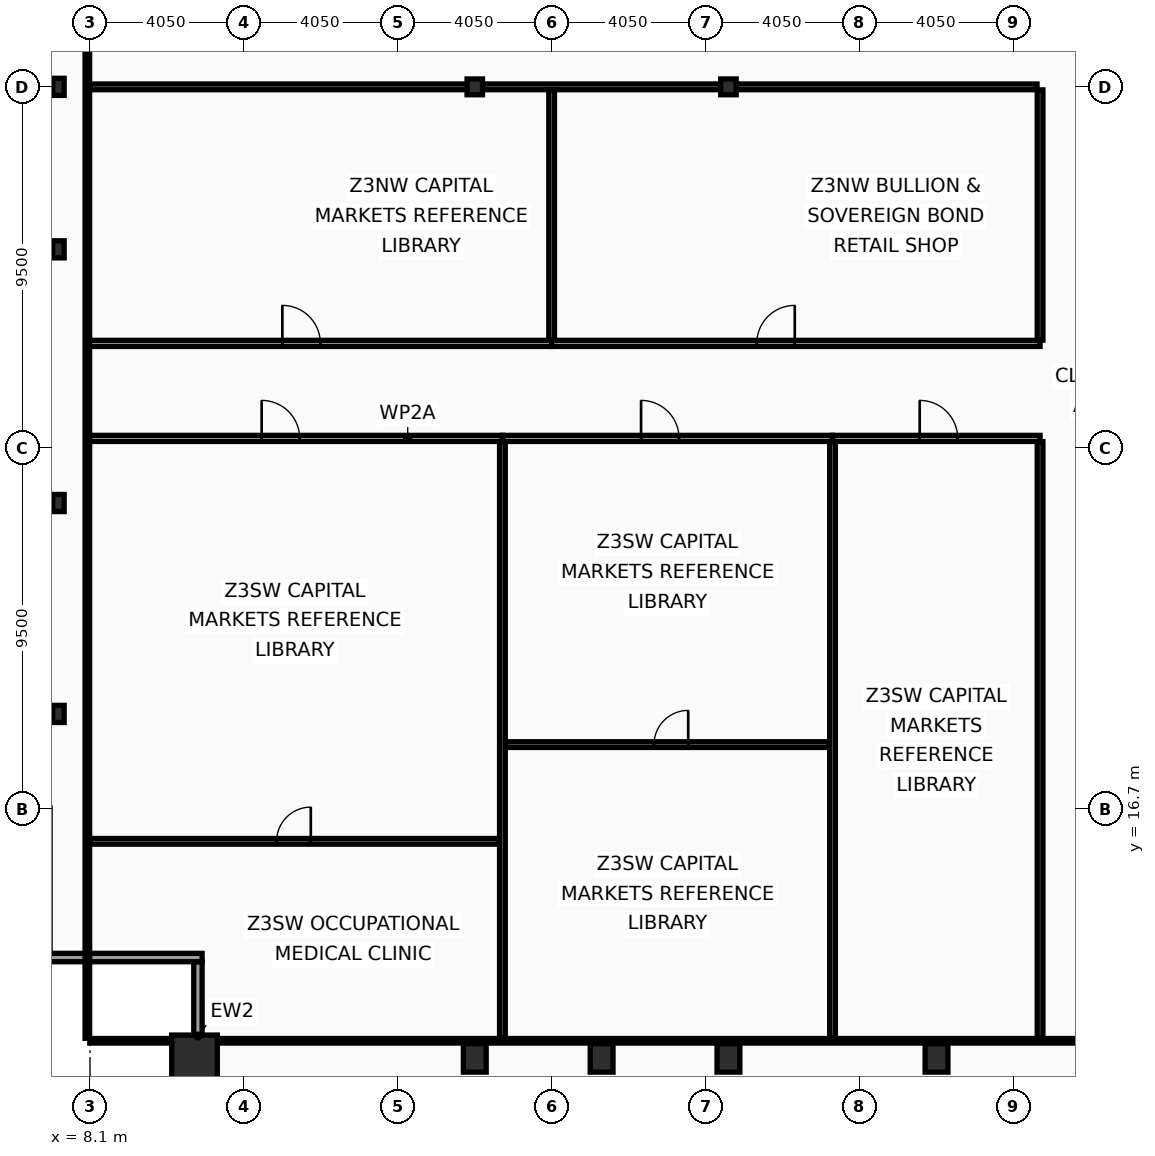
"""IFC4 building model, lengths in metres.
Left out: names, types, materials, properties, quantities, classifications, styles, units other than length and angle.
Written with IfcOpenShell. Run it as: python <this file> out.ifc"""

import sys

from ifc_helpers import new_model, si_unit, direction, frame, frame_2d, origin, origin_2d, place, context, subcontext, project, spatial, rectangle, hollow_rectangle, i_section, extrude, element, fill, save


model = new_model("IFC4")
c1 = context("Model", 3, precision=1e-05, world=origin(), true_north=direction((0.0, 1.0)))
c2 = subcontext(c1, "Body", "Model", "MODEL_VIEW")
j1 = project(units=[si_unit("LENGTHUNIT", "METRE"), si_unit("PLANEANGLEUNIT", "RADIAN")], contexts=[c1])
p1 = place(None, origin())
s1 = spatial("IfcSite", under=j1, at=p1, CompositionType="ELEMENT")
p2 = place(p1, origin())
s2 = spatial("IfcBuilding", under=s1, at=p2, CompositionType="ELEMENT")
p3 = place(p2, frame((0.0, 0.0, 199.4)))
s3 = spatial("IfcBuildingStorey", under=s2, at=p3, CompositionType="ELEMENT", Elevation=199.4)
p4 = place(p3, frame((10.85, 10.15, 0.0), z_axis=(0.0, 0.0, 1.0), x_axis=(1.0, 0.0, 0.0)))
e1 = element("IfcColumn", 1, at=p4, inside=s3, PredefinedType="COLUMN", context=c2, shape_type="SweptSolid", body=[
    extrude(hollow_rectangle(XDim=1.2, YDim=1.2, WallThickness=0.06, at=origin_2d()), origin(), (0.0, 0.0, 1.0), 3.6),
])
for number, where, z_axis, x_axis in (
    (2, (18.225, 10.15, 0.0), (0.0, 0.0, 1.0), (1.0, 0.0, 0.0)),
    (3, (21.562, 10.15, 0.0), (0.0, 0.0, 1.0), (1.0, 0.0, 0.0)),
    (4, (24.9, 10.15, 0.0), (0.0, 0.0, 1.0), (1.0, 0.0, 0.0)),
    (5, (30.375, 10.15, 0.0), (0.0, 0.0, 1.0), (1.0, 0.0, 0.0)),
):
    element("IfcColumn", number, at=place(p3, frame(where, z_axis=z_axis, x_axis=x_axis)), inside=s3, PredefinedType="COLUMN", context=c2, shape_type="SweptSolid", body=[
        extrude(hollow_rectangle(XDim=0.6, YDim=0.75, WallThickness=0.045, at=origin_2d()), origin(), (0.0, 0.0, 1.0), 3.6),
    ])
for number, where, z_axis, x_axis in (
    (6, (7.27, 19.2, 0.0), (0.0, 0.0, 1.0), (1.0, 0.0, 0.0)),
    (7, (7.27, 24.75, 0.0), (0.0, 0.0, 1.0), (1.0, 0.0, 0.0)),
    (8, (7.27, 31.425, 0.0), (0.0, 0.0, 1.0), (1.0, 0.0, 0.0)),
    (9, (7.27, 35.7, 0.0), (0.0, 0.0, 1.0), (1.0, 0.0, 0.0)),
):
    element("IfcColumn", number, at=place(p3, frame(where, z_axis=z_axis, x_axis=x_axis)), inside=s3, PredefinedType="COLUMN", context=c2, shape_type="SweptSolid", body=[
        extrude(i_section(OverallWidth=0.3, OverallDepth=0.45, WebThickness=0.014, FlangeThickness=0.026, at=origin_2d()), origin(), (0.0, 0.0, 1.0), 3.6),
    ])
for number, where, z_axis, x_axis in (
    (10, (18.225, 35.7, 0.0), (0.0, 0.0, 1.0), (1.0, 0.0, 0.0)),
    (11, (24.9, 35.7, 0.0), (0.0, 0.0, 1.0), (1.0, 0.0, 0.0)),
):
    element("IfcColumn", number, at=place(p3, frame(where, z_axis=z_axis, x_axis=x_axis)), inside=s3, PredefinedType="COLUMN", context=c2, shape_type="SweptSolid", body=[
        extrude(i_section(OverallWidth=0.406, OverallDepth=0.416, WebThickness=0.03, FlangeThickness=0.048, at=origin_2d()), origin(), (0.0, 0.0, 1.0), 3.6),
    ])
p5 = place(p3, frame((10.94, 8.77, 0.0), z_axis=(0.0, 0.0, 1.0), x_axis=(0.0, 1.0, 0.0)))
e12 = element("IfcWall", 12, at=p5, inside=s3, PredefinedType="SOLIDWALL", context=c2, shape_type="SweptSolid", body=[
    extrude(rectangle(XDim=3.91, YDim=0.22, at=frame_2d((1.955, 0.0))), origin(), (0.0, 0.0, 1.0), 2.83),
])
p6 = place(p3, frame((11.05, 12.79, 0.0), z_axis=(0.0, 0.0, 1.0), x_axis=(-1.0, 0.0, 0.0)))
e13 = element("IfcWall", 13, at=p6, inside=s3, PredefinedType="SOLIDWALL", context=c2, shape_type="SweptSolid", body=[
    extrude(rectangle(XDim=4.22, YDim=0.22, at=frame_2d((2.11, 0.0))), origin(), (0.0, 0.0, 1.0), 2.83),
])
p7 = place(p3, frame((33.1, 10.665, 0.0), z_axis=(0.0, 0.0, 1.0), x_axis=(0.0, 1.0, 0.0)))
e14 = element("IfcWall", 14, at=p7, inside=s3, PredefinedType="PARTITIONING", context=c2, shape_type="SweptSolid", body=[
    extrude(rectangle(XDim=15.7, YDim=0.15, at=frame_2d((7.85, 0.0))), origin(), (0.0, 0.0, 1.0), 2.98),
])
p8 = place(p3, frame((33.1, 29.035, 0.0), z_axis=(0.0, 0.0, 1.0), x_axis=(0.0, 1.0, 0.0)))
e15 = element("IfcWall", 15, at=p8, inside=s3, PredefinedType="PARTITIONING", context=c2, shape_type="SweptSolid", body=[
    extrude(rectangle(XDim=6.585, YDim=0.15, at=frame_2d((3.292, 0.0))), origin(), (0.0, 0.0, 1.0), 2.98),
])
p9 = place(p3, frame((8.095, 35.7, 0.0), z_axis=(0.0, 0.0, 1.0), x_axis=(1.0, 0.0, 0.0)))
e16 = element("IfcWall", 16, at=p9, inside=s3, PredefinedType="PARTITIONING", context=c2, shape_type="SweptSolid", body=[
    extrude(rectangle(XDim=24.925, YDim=0.15, at=frame_2d((12.462, 0.0))), origin(), (0.0, 0.0, 1.0), 2.73),
])
p10 = place(p3, frame((8.03, 26.45, 0.0), z_axis=(0.0, 0.0, 1.0), x_axis=(1.0, 0.0, 0.0)))
e17 = element("IfcWall", 17, at=p10, inside=s3, PredefinedType="PARTITIONING", context=c2, shape_type="SweptSolid", body=[
    extrude(rectangle(XDim=10.922, YDim=0.16, at=frame_2d((5.461, 0.0))), origin(), (0.0, 0.0, 1.0), 2.73),
])
p11 = place(p10, frame((4.587, 0.0, 0.0)))
e18 = element("IfcOpeningElement", 18, at=p11, cuts=e17, PredefinedType="OPENING", context=c2, shape_type="SweptSolid", body=[
    extrude(rectangle(XDim=1.0, YDim=2.05, at=frame_2d((0.5, 1.025))), frame((0.0, 0.09, 0.0), z_axis=(0.0, -1.0, 0.0), x_axis=(1.0, 0.0, 0.0)), (0.0, 0.0, 1.0), 0.18),
])
p12 = place(p3, frame((8.095, 15.848, 0.0), z_axis=(0.0, 0.0, 1.0), x_axis=(1.0, 0.0, 0.0)))
e19 = element("IfcWall", 19, at=p12, inside=s3, PredefinedType="PARTITIONING", context=c2, shape_type="SweptSolid", body=[
    extrude(rectangle(XDim=10.777, YDim=0.15, at=frame_2d((5.389, 0.0))), origin(), (0.0, 0.0, 1.0), 2.73),
])
p13 = place(p12, frame((4.915, 0.0, 0.0)))
e20 = element("IfcOpeningElement", 20, at=p13, cuts=e19, PredefinedType="OPENING", context=c2, shape_type="SweptSolid", body=[
    extrude(rectangle(XDim=0.9, YDim=2.05, at=frame_2d((0.45, 1.025))), frame((0.0, 0.085, 0.0), z_axis=(0.0, -1.0, 0.0), x_axis=(1.0, 0.0, 0.0)), (0.0, 0.0, 1.0), 0.17),
])
p14 = place(p3, frame((18.952, 26.45, 0.0), z_axis=(0.0, 0.0, 1.0), x_axis=(1.0, 0.0, 0.0)))
e21 = element("IfcWall", 21, at=p14, inside=s3, PredefinedType="PARTITIONING", context=c2, shape_type="SweptSolid", body=[
    extrude(rectangle(XDim=8.687, YDim=0.16, at=frame_2d((4.343, 0.0))), origin(), (0.0, 0.0, 1.0), 2.73),
])
p15 = place(p14, frame((3.648, 0.0, 0.0)))
e22 = element("IfcOpeningElement", 22, at=p15, cuts=e21, PredefinedType="OPENING", context=c2, shape_type="SweptSolid", body=[
    extrude(rectangle(XDim=1.0, YDim=2.05, at=frame_2d((0.5, 1.025))), frame((0.0, 0.09, 0.0), z_axis=(0.0, -1.0, 0.0), x_axis=(1.0, 0.0, 0.0)), (0.0, 0.0, 1.0), 0.18),
])
p16 = place(p3, frame((18.952, 10.665, 0.0), z_axis=(0.0, 0.0, 1.0), x_axis=(0.0, 1.0, 0.0)))
e23 = element("IfcWall", 23, at=p16, inside=s3, PredefinedType="PARTITIONING", context=c2, shape_type="SweptSolid", body=[
    extrude(rectangle(XDim=15.7, YDim=0.15, at=frame_2d((7.85, 0.0))), origin(), (0.0, 0.0, 1.0), 2.98),
])
p17 = place(p3, frame((19.032, 18.393, 0.0), z_axis=(0.0, 0.0, 1.0), x_axis=(1.0, 0.0, 0.0)))
e24 = element("IfcWall", 24, at=p17, inside=s3, PredefinedType="PARTITIONING", context=c2, shape_type="SweptSolid", body=[
    extrude(rectangle(XDim=8.527, YDim=0.15, at=frame_2d((4.263, 0.0))), origin(), (0.0, 0.0, 1.0), 2.73),
])
p18 = place(p17, frame((3.909, 0.0, 0.0)))
e25 = element("IfcOpeningElement", 25, at=p18, cuts=e24, PredefinedType="OPENING", context=c2, shape_type="SweptSolid", body=[
    extrude(rectangle(XDim=0.9, YDim=2.05, at=frame_2d((0.45, 1.025))), frame((0.0, 0.085, 0.0), z_axis=(0.0, -1.0, 0.0), x_axis=(1.0, 0.0, 0.0)), (0.0, 0.0, 1.0), 0.17),
])
p19 = place(p3, frame((27.639, 26.45, 0.0), z_axis=(0.0, 0.0, 1.0), x_axis=(1.0, 0.0, 0.0)))
e26 = element("IfcWall", 26, at=p19, inside=s3, PredefinedType="PARTITIONING", context=c2, shape_type="SweptSolid", body=[
    extrude(rectangle(XDim=5.461, YDim=0.16, at=frame_2d((2.73, 0.0))), origin(), (0.0, 0.0, 1.0), 2.73),
])
p20 = place(p19, frame((2.294, 0.0, 0.0)))
e27 = element("IfcOpeningElement", 27, at=p20, cuts=e26, PredefinedType="OPENING", context=c2, shape_type="SweptSolid", body=[
    extrude(rectangle(XDim=1.0, YDim=2.05, at=frame_2d((0.5, 1.025))), frame((0.0, 0.09, 0.0), z_axis=(0.0, -1.0, 0.0), x_axis=(1.0, 0.0, 0.0)), (0.0, 0.0, 1.0), 0.18),
])
p21 = place(p3, frame((27.639, 10.665, 0.0), z_axis=(0.0, 0.0, 1.0), x_axis=(0.0, 1.0, 0.0)))
e28 = element("IfcWall", 28, at=p21, inside=s3, PredefinedType="PARTITIONING", context=c2, shape_type="SweptSolid", body=[
    extrude(rectangle(XDim=15.7, YDim=0.15, at=frame_2d((7.85, 0.0))), origin(), (0.0, 0.0, 1.0), 2.98),
])
p22 = place(p3, frame((8.03, 28.95, 0.0), z_axis=(0.0, 0.0, 1.0), x_axis=(1.0, 0.0, 0.0)))
e29 = element("IfcWall", 29, at=p22, inside=s3, PredefinedType="PARTITIONING", context=c2, shape_type="SweptSolid", body=[
    extrude(rectangle(XDim=12.217, YDim=0.16, at=frame_2d((6.108, 0.0))), origin(), (0.0, 0.0, 1.0), 2.73),
])
p23 = place(p22, frame((5.131, 0.0, 0.0)))
e30 = element("IfcOpeningElement", 30, at=p23, cuts=e29, PredefinedType="OPENING", context=c2, shape_type="SweptSolid", body=[
    extrude(rectangle(XDim=1.0, YDim=2.05, at=frame_2d((0.5, 1.025))), frame((0.0, 0.09, 0.0), z_axis=(0.0, -1.0, 0.0), x_axis=(1.0, 0.0, 0.0)), (0.0, 0.0, 1.0), 0.18),
])
p24 = place(p3, frame((20.247, 28.95, 0.0), z_axis=(0.0, 0.0, 1.0), x_axis=(1.0, 0.0, 0.0)))
e31 = element("IfcWall", 31, at=p24, inside=s3, PredefinedType="PARTITIONING", context=c2, shape_type="SweptSolid", body=[
    extrude(rectangle(XDim=12.853, YDim=0.16, at=frame_2d((6.427, 0.0))), origin(), (0.0, 0.0, 1.0), 2.73),
])
p25 = place(p24, frame((5.398, 0.0, 0.0)))
e32 = element("IfcOpeningElement", 32, at=p25, cuts=e31, PredefinedType="OPENING", context=c2, shape_type="SweptSolid", body=[
    extrude(rectangle(XDim=1.0, YDim=2.05, at=frame_2d((0.5, 1.025))), frame((0.0, 0.09, 0.0), z_axis=(0.0, -1.0, 0.0), x_axis=(1.0, 0.0, 0.0)), (0.0, 0.0, 1.0), 0.18),
])
p26 = place(p3, frame((20.247, 29.035, 0.0), z_axis=(0.0, 0.0, 1.0), x_axis=(0.0, 1.0, 0.0)))
e33 = element("IfcWall", 33, at=p26, inside=s3, PredefinedType="PARTITIONING", context=c2, shape_type="SweptSolid", body=[
    extrude(rectangle(XDim=6.585, YDim=0.15, at=frame_2d((3.292, 0.0))), origin(), (0.0, 0.0, 1.0), 2.98),
])
p27 = place(p3, frame((8.03, 10.665, 0.0), z_axis=(0.0, 0.0, 1.0), x_axis=(0.0, 1.0, 0.0)))
e34 = element("IfcWall", 34, at=p27, inside=s3, PredefinedType="PARTITIONING", context=c2, shape_type="SweptSolid", body=[
    extrude(rectangle(XDim=42.11, YDim=0.12, at=frame_2d((21.055, 0.0))), origin(), (0.0, 0.0, 1.0), 2.73),
])
p28 = place(p3, frame((8.095, 10.6, 0.0), z_axis=(0.0, 0.0, 1.0), x_axis=(1.0, 0.0, 0.0)))
e35 = element("IfcWall", 35, at=p28, inside=s3, PredefinedType="PARTITIONING", context=c2, shape_type="SweptSolid", body=[
    extrude(rectangle(XDim=56.71, YDim=0.12, at=frame_2d((28.355, 0.0))), origin(), (0.0, 0.0, 1.0), 2.73),
])
p29 = place(p11, origin())
e36 = element("IfcDoor", 36, at=p29, inside=s3, OperationType="SINGLE_SWING_LEFT", PredefinedType="DOOR", context=c2, shape_type="SweptSolid", body=[
    extrude(rectangle(XDim=1.0, YDim=2.05, at=frame_2d((0.5, 1.025))), frame((0.0, 0.025, 0.0), z_axis=(0.0, -1.0, 0.0), x_axis=(1.0, 0.0, 0.0)), (0.0, 0.0, 1.0), 0.05),
])
fill(e18, e36)
p30 = place(p13, origin())
e37 = element("IfcDoor", 37, at=p30, inside=s3, OperationType="SINGLE_SWING_RIGHT", PredefinedType="DOOR", context=c2, shape_type="SweptSolid", body=[
    extrude(rectangle(XDim=0.9, YDim=2.05, at=frame_2d((0.45, 1.025))), frame((0.0, 0.025, 0.0), z_axis=(0.0, -1.0, 0.0), x_axis=(1.0, 0.0, 0.0)), (0.0, 0.0, 1.0), 0.05),
])
fill(e20, e37)
p31 = place(p15, origin())
e38 = element("IfcDoor", 38, at=p31, inside=s3, OperationType="SINGLE_SWING_LEFT", PredefinedType="DOOR", context=c2, shape_type="SweptSolid", body=[
    extrude(rectangle(XDim=1.0, YDim=2.05, at=frame_2d((0.5, 1.025))), frame((0.0, 0.025, 0.0), z_axis=(0.0, -1.0, 0.0), x_axis=(1.0, 0.0, 0.0)), (0.0, 0.0, 1.0), 0.05),
])
fill(e22, e38)
p32 = place(p18, origin())
e39 = element("IfcDoor", 39, at=p32, inside=s3, OperationType="SINGLE_SWING_RIGHT", PredefinedType="DOOR", context=c2, shape_type="SweptSolid", body=[
    extrude(rectangle(XDim=0.9, YDim=2.05, at=frame_2d((0.45, 1.025))), frame((0.0, 0.025, 0.0), z_axis=(0.0, -1.0, 0.0), x_axis=(1.0, 0.0, 0.0)), (0.0, 0.0, 1.0), 0.05),
])
fill(e25, e39)
p33 = place(p20, origin())
e40 = element("IfcDoor", 40, at=p33, inside=s3, OperationType="SINGLE_SWING_LEFT", PredefinedType="DOOR", context=c2, shape_type="SweptSolid", body=[
    extrude(rectangle(XDim=1.0, YDim=2.05, at=frame_2d((0.5, 1.025))), frame((0.0, 0.025, 0.0), z_axis=(0.0, -1.0, 0.0), x_axis=(1.0, 0.0, 0.0)), (0.0, 0.0, 1.0), 0.05),
])
fill(e27, e40)
p34 = place(p23, origin())
e41 = element("IfcDoor", 41, at=p34, inside=s3, OperationType="SINGLE_SWING_LEFT", PredefinedType="DOOR", context=c2, shape_type="SweptSolid", body=[
    extrude(rectangle(XDim=1.0, YDim=2.05, at=frame_2d((0.5, 1.025))), frame((0.0, 0.025, 0.0), z_axis=(0.0, -1.0, 0.0), x_axis=(1.0, 0.0, 0.0)), (0.0, 0.0, 1.0), 0.05),
])
fill(e30, e41)
p35 = place(p25, origin())
e42 = element("IfcDoor", 42, at=p35, inside=s3, OperationType="SINGLE_SWING_RIGHT", PredefinedType="DOOR", context=c2, shape_type="SweptSolid", body=[
    extrude(rectangle(XDim=1.0, YDim=2.05, at=frame_2d((0.5, 1.025))), frame((0.0, 0.025, 0.0), z_axis=(0.0, -1.0, 0.0), x_axis=(1.0, 0.0, 0.0)), (0.0, 0.0, 1.0), 0.05),
])
fill(e32, e42)
save(model, sys.argv[1])
